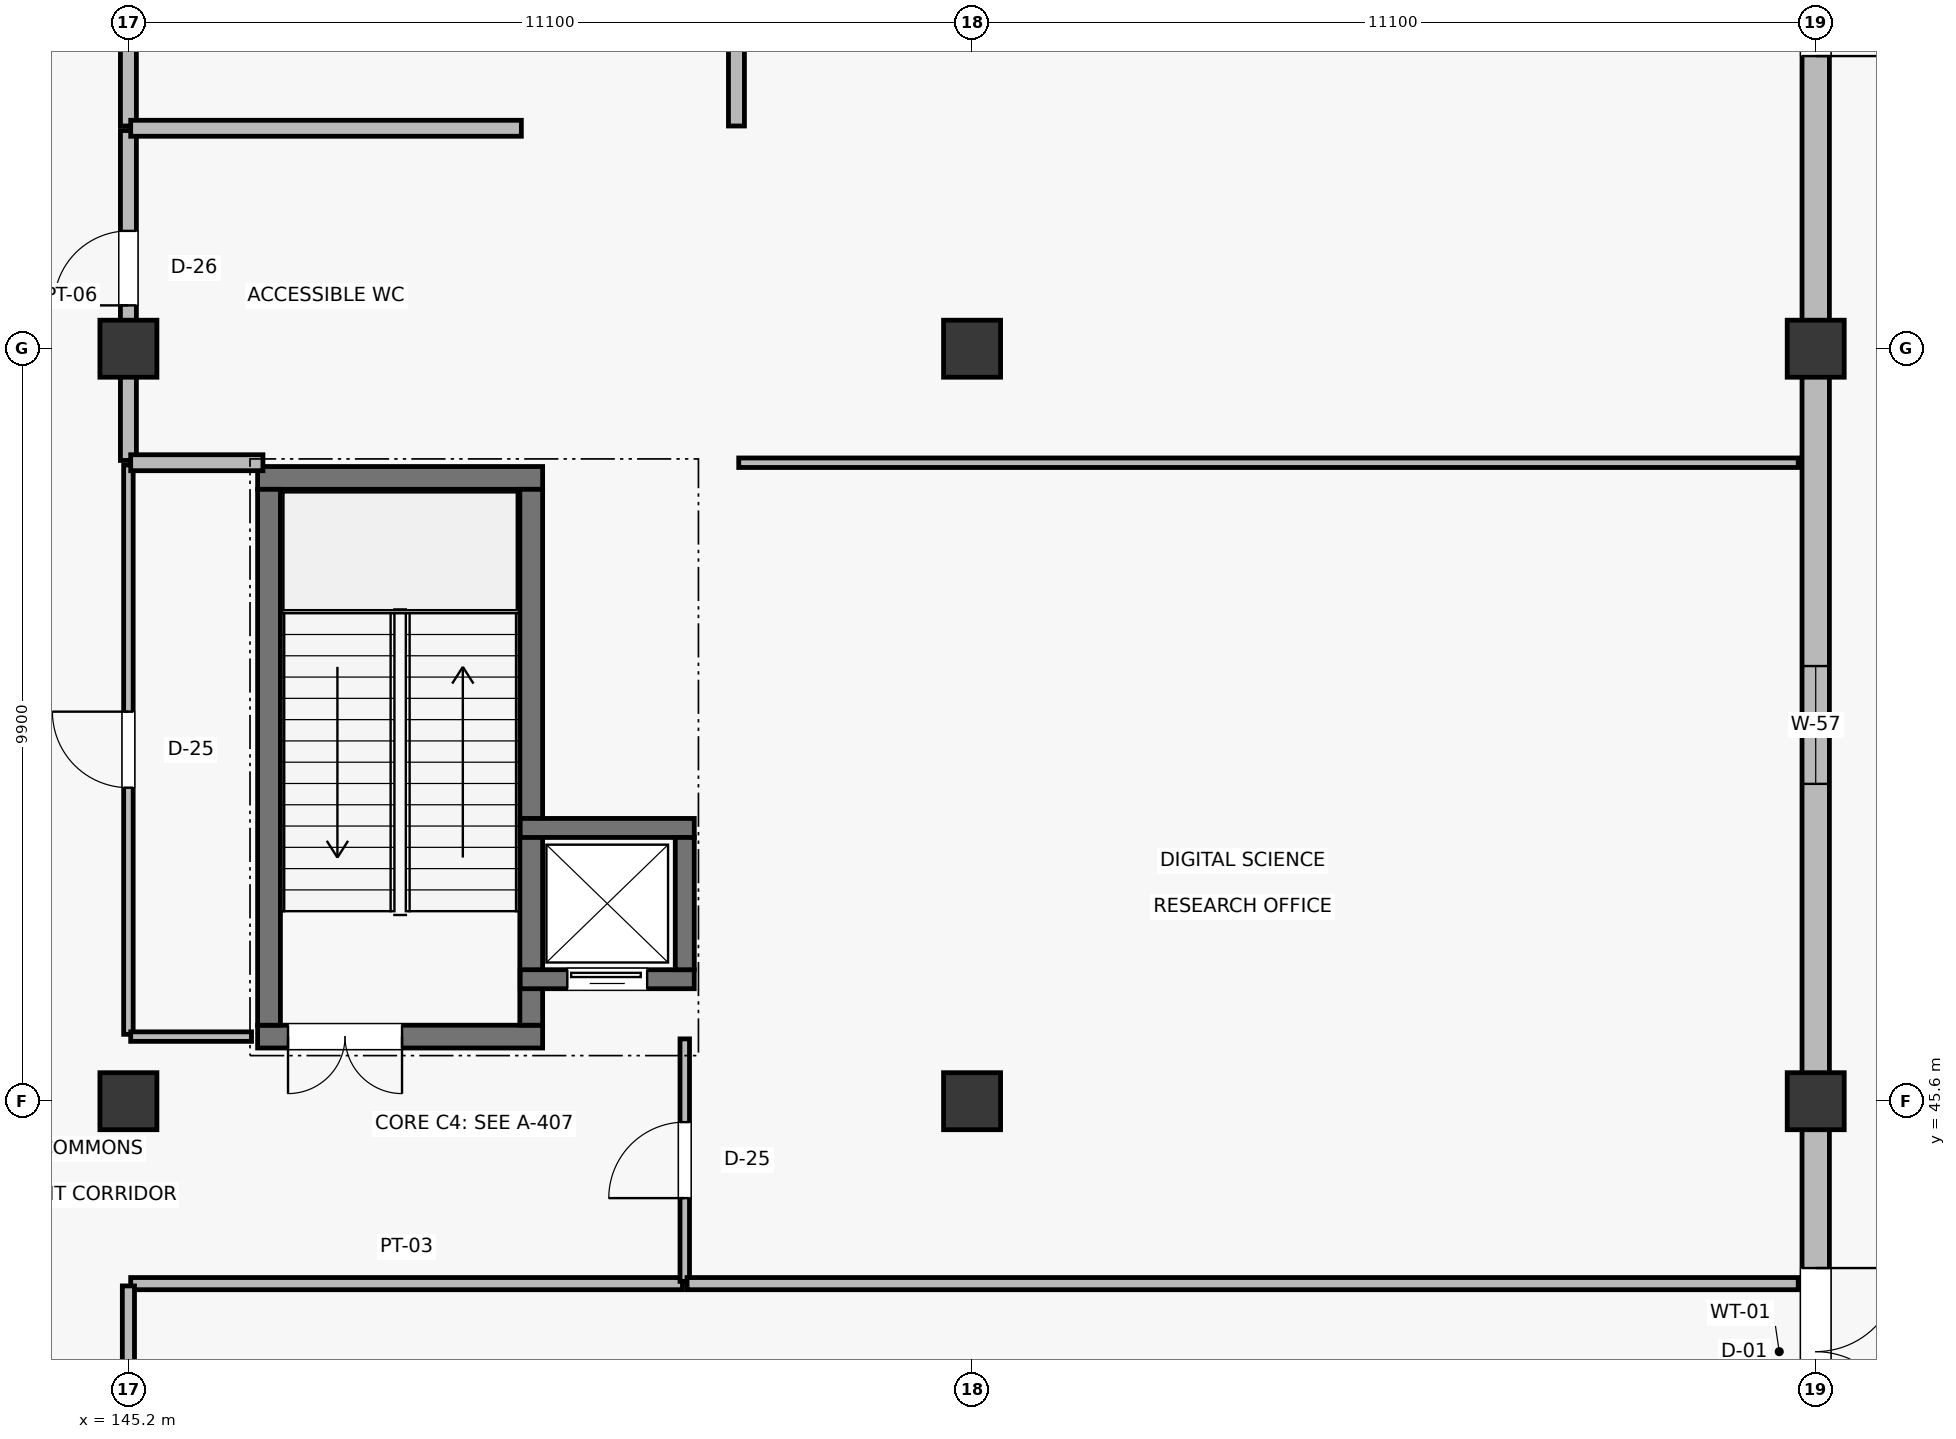
"""IFC4 building model, lengths in metres.
Left out: names, types, materials, properties, quantities, classifications, styles, units other than length and angle.
Written with IfcOpenShell. Run it as: python <this file> out.ifc"""

import sys

from ifc_helpers import new_model, si_unit, direction, frame, frame_2d, origin, origin_2d, place, context, subcontext, project, spatial, rectangle, extrude, element, fill, save


model = new_model("IFC4")
c1 = context("Model", 3, precision=1e-05, world=origin(), true_north=direction((0.0, 1.0)))
c2 = subcontext(c1, "Body", "Model", "MODEL_VIEW")
j1 = project(units=[si_unit("LENGTHUNIT", "METRE"), si_unit("PLANEANGLEUNIT", "RADIAN")], contexts=[c1])
p1 = place(None, origin())
s1 = spatial("IfcSite", under=j1, at=p1, CompositionType="ELEMENT")
p2 = place(p1, origin())
s2 = spatial("IfcBuilding", under=s1, at=p2, CompositionType="ELEMENT")
p3 = place(p2, origin())
s3 = spatial("IfcBuildingStorey", under=s2, at=p3, CompositionType="ELEMENT", Elevation=0.0)
for number, where, z_axis, x_axis in (
    (1, (145.2, 45.6, 0.0), (0.0, 0.0, 1.0), (1.0, 0.0, 0.0)),
    (2, (145.2, 55.5, 0.0), (0.0, 0.0, 1.0), (1.0, 0.0, 0.0)),
    (3, (156.3, 45.6, 0.0), (0.0, 0.0, 1.0), (1.0, 0.0, 0.0)),
    (4, (156.3, 55.5, 0.0), (0.0, 0.0, 1.0), (1.0, 0.0, 0.0)),
    (5, (167.4, 45.6, 0.0), (0.0, 0.0, 1.0), (1.0, 0.0, 0.0)),
    (6, (167.4, 55.5, 0.0), (0.0, 0.0, 1.0), (1.0, 0.0, 0.0)),
):
    element("IfcColumn", number, at=place(p3, frame(where, z_axis=z_axis, x_axis=x_axis)), inside=s3, PredefinedType="COLUMN", context=c2, shape_type="SweptSolid", body=[
        extrude(rectangle(XDim=0.75, YDim=0.75, at=origin_2d()), origin(), (0.0, 0.0, 1.0), 5.4),
    ])
p4 = place(p3, frame((167.4, 39.365, 0.0), z_axis=(0.0, 0.0, 1.0), x_axis=(0.0, 1.0, 0.0)))
e7 = element("IfcWall", 7, at=p4, inside=s3, PredefinedType="SOLIDWALL", context=c2, shape_type="SweptSolid", body=[
    extrude(rectangle(XDim=5.88, YDim=0.36, at=frame_2d((2.94, 0.0))), origin(), (0.0, 0.0, 1.0), 4.415),
])
p5 = place(p4, frame((1.84, 0.0, 0.0)))
e8 = element("IfcOpeningElement", 8, at=p5, cuts=e7, PredefinedType="OPENING", context=c2, shape_type="SweptSolid", body=[
    extrude(rectangle(XDim=2.2, YDim=2.5, at=frame_2d((1.1, 1.25))), frame((0.0, 0.19, 0.0), z_axis=(0.0, -1.0, 0.0), x_axis=(1.0, 0.0, 0.0)), (0.0, 0.0, 1.0), 0.38),
])
p6 = place(p3, frame((167.4, 45.965, 0.0), z_axis=(0.0, 0.0, 1.0), x_axis=(0.0, 1.0, 0.0)))
e9 = element("IfcWall", 9, at=p6, inside=s3, PredefinedType="SOLIDWALL", context=c2, shape_type="SweptSolid", body=[
    extrude(rectangle(XDim=9.17, YDim=0.36, at=frame_2d((4.585, 0.0))), origin(), (0.0, 0.0, 1.0), 4.415),
])
p7 = place(p6, frame((3.81, 0.0, 0.85)))
e10 = element("IfcOpeningElement", 10, at=p7, cuts=e9, PredefinedType="OPENING", context=c2, shape_type="SweptSolid", body=[
    extrude(rectangle(XDim=1.55, YDim=1.15, at=frame_2d((0.775, 0.575))), frame((0.0, 0.19, 0.0), z_axis=(0.0, -1.0, 0.0), x_axis=(1.0, 0.0, 0.0)), (0.0, 0.0, 1.0), 0.38),
])
p8 = place(p3, frame((167.4, 55.865, 0.0), z_axis=(0.0, 0.0, 1.0), x_axis=(0.0, 1.0, 0.0)))
e11 = element("IfcWall", 11, at=p8, inside=s3, PredefinedType="SOLIDWALL", context=c2, shape_type="SweptSolid", body=[
    extrude(rectangle(XDim=9.17, YDim=0.36, at=frame_2d((4.585, 0.0))), origin(), (0.0, 0.0, 1.0), 4.415),
])
p9 = place(p8, frame((3.485, 0.0, 0.0)))
e12 = element("IfcOpeningElement", 12, at=p9, cuts=e11, PredefinedType="OPENING", context=c2, shape_type="SweptSolid", body=[
    extrude(rectangle(XDim=2.2, YDim=2.5, at=frame_2d((1.1, 1.25))), frame((0.0, 0.19, 0.0), z_axis=(0.0, -1.0, 0.0), x_axis=(1.0, 0.0, 0.0)), (0.0, 0.0, 1.0), 0.38),
])
p10 = place(p3, frame((146.9, 46.45, 0.0), z_axis=(0.0, 0.0, 1.0), x_axis=(1.0, 0.0, 0.0)))
e13 = element("IfcWall", 13, at=p10, inside=s3, PredefinedType="SHEAR", context=c2, shape_type="SweptSolid", body=[
    extrude(rectangle(XDim=3.75, YDim=0.3, at=frame_2d((1.875, 0.0))), origin(), (0.0, 0.0, 1.0), 5.18),
])
p11 = place(p10, frame((0.4, 0.0, 0.0)))
e14 = element("IfcOpeningElement", 14, at=p11, cuts=e13, PredefinedType="OPENING", context=c2, shape_type="SweptSolid", body=[
    extrude(rectangle(XDim=1.5, YDim=2.2, at=frame_2d((0.75, 1.1))), frame((0.0, 0.16, 0.0), z_axis=(0.0, -1.0, 0.0), x_axis=(1.0, 0.0, 0.0)), (0.0, 0.0, 1.0), 0.32),
])
p12 = place(p3, frame((146.9, 53.8, 0.0), z_axis=(0.0, 0.0, 1.0), x_axis=(1.0, 0.0, 0.0)))
e15 = element("IfcWall", 15, at=p12, inside=s3, PredefinedType="SHEAR", context=c2, shape_type="SweptSolid", body=[
    extrude(rectangle(XDim=3.75, YDim=0.3, at=frame_2d((1.875, 0.0))), origin(), (0.0, 0.0, 1.0), 5.18),
])
for number, where, z_axis, x_axis in (
    (16, (147.05, 46.6, 0.0), (0.0, 0.0, 1.0), (0.0, 1.0, 0.0)),
    (17, (150.5, 46.6, 0.0), (0.0, 0.0, 1.0), (0.0, 1.0, 0.0)),
):
    element("IfcWall", number, at=place(p3, frame(where, z_axis=z_axis, x_axis=x_axis)), inside=s3, PredefinedType="SHEAR", context=c2, shape_type="SweptSolid", body=[
        extrude(rectangle(XDim=7.05, YDim=0.3, at=frame_2d((3.525, 0.0))), origin(), (0.0, 0.0, 1.0), 5.18),
    ])
p13 = place(p3, frame((150.355, 47.205, 0.0), z_axis=(0.0, 0.0, 1.0), x_axis=(1.0, 0.0, 0.0)))
e18 = element("IfcWall", 18, at=p13, inside=s3, PredefinedType="SHEAR", context=c2, shape_type="SweptSolid", body=[
    extrude(rectangle(XDim=2.29, YDim=0.25, at=frame_2d((1.145, 0.0))), origin(), (0.0, 0.0, 1.0), 5.16),
])
p14 = place(p13, frame((0.62, 0.0, 0.0)))
e19 = element("IfcOpeningElement", 19, at=p14, cuts=e18, PredefinedType="OPENING", context=c2, shape_type="SweptSolid", body=[
    extrude(rectangle(XDim=1.05, YDim=2.15, at=frame_2d((0.525, 1.075))), frame((0.0, 0.135, 0.0), z_axis=(0.0, -1.0, 0.0), x_axis=(1.0, 0.0, 0.0)), (0.0, 0.0, 1.0), 0.27),
])
p15 = place(p3, frame((150.355, 49.195, 0.0), z_axis=(0.0, 0.0, 1.0), x_axis=(1.0, 0.0, 0.0)))
e20 = element("IfcWall", 20, at=p15, inside=s3, PredefinedType="SHEAR", context=c2, shape_type="SweptSolid", body=[
    extrude(rectangle(XDim=2.29, YDim=0.25, at=frame_2d((1.145, 0.0))), origin(), (0.0, 0.0, 1.0), 5.16),
])
p16 = place(p3, frame((152.52, 47.33, 0.0), z_axis=(0.0, 0.0, 1.0), x_axis=(0.0, 1.0, 0.0)))
e21 = element("IfcWall", 21, at=p16, inside=s3, PredefinedType="SHEAR", context=c2, shape_type="SweptSolid", body=[
    extrude(rectangle(XDim=1.74, YDim=0.25, at=frame_2d((0.87, 0.0))), origin(), (0.0, 0.0, 1.0), 5.16),
])
p17 = place(p3, frame((145.23, 43.2, 0.0), z_axis=(0.0, 0.0, 1.0), x_axis=(1.0, 0.0, 0.0)))
e22 = element("IfcWall", 22, at=p17, inside=s3, PredefinedType="PARTITIONING", context=c2, shape_type="SweptSolid", body=[
    extrude(rectangle(XDim=7.26, YDim=0.16, at=frame_2d((3.63, 0.0))), origin(), (0.0, 0.0, 1.0), 4.465),
])
p18 = place(p3, frame((145.2, 36.13, 0.0), z_axis=(0.0, 0.0, 1.0), x_axis=(0.0, 1.0, 0.0)))
e23 = element("IfcWall", 23, at=p18, inside=s3, PredefinedType="PARTITIONING", context=c2, shape_type="SweptSolid", body=[
    extrude(rectangle(XDim=7.04, YDim=0.16, at=frame_2d((3.52, 0.0))), origin(), (0.0, 0.0, 1.0), 4.465),
])
p19 = place(p3, frame((152.52, 43.23, 0.0), z_axis=(0.0, 0.0, 1.0), x_axis=(0.0, 1.0, 0.0)))
e24 = element("IfcWall", 24, at=p19, inside=s3, PredefinedType="PARTITIONING", context=c2, shape_type="SweptSolid", body=[
    extrude(rectangle(XDim=3.19, YDim=0.125, at=frame_2d((1.595, 0.0))), origin(), (0.0, 0.0, 1.0), 4.355),
])
p20 = place(p19, frame((1.095, 0.0, 0.0)))
e25 = element("IfcOpeningElement", 25, at=p20, cuts=e24, PredefinedType="OPENING", context=c2, shape_type="SweptSolid", body=[
    extrude(rectangle(XDim=1.0, YDim=2.15, at=frame_2d((0.5, 1.075))), frame((0.0, 0.073, 0.0), z_axis=(0.0, -1.0, 0.0), x_axis=(1.0, 0.0, 0.0)), (0.0, 0.0, 1.0), 0.145),
])
p21 = place(p3, frame((145.2, 54.03, 0.0), z_axis=(0.0, 0.0, 1.0), x_axis=(0.0, 1.0, 0.0)))
e26 = element("IfcWall", 26, at=p21, inside=s3, PredefinedType="PLUMBINGWALL", context=c2, shape_type="SweptSolid", body=[
    extrude(rectangle(XDim=4.34, YDim=0.21, at=frame_2d((2.17, 0.0))), origin(), (0.0, 0.0, 1.0), 4.265),
])
p22 = place(p21, frame((2.04, 0.0, 0.0)))
e27 = element("IfcOpeningElement", 27, at=p22, cuts=e26, PredefinedType="OPENING", context=c2, shape_type="SweptSolid", body=[
    extrude(rectangle(XDim=0.98, YDim=2.1, at=frame_2d((0.49, 1.05))), frame((0.0, 0.115, 0.0), z_axis=(0.0, -1.0, 0.0), x_axis=(1.0, 0.0, 0.0)), (0.0, 0.0, 1.0), 0.23),
])
p23 = place(p3, frame((145.2, 58.43, 0.0), z_axis=(0.0, 0.0, 1.0), x_axis=(0.0, 1.0, 0.0)))
e28 = element("IfcWall", 28, at=p23, inside=s3, PredefinedType="PLUMBINGWALL", context=c2, shape_type="SweptSolid", body=[
    extrude(rectangle(XDim=6.34, YDim=0.21, at=frame_2d((3.17, 0.0))), origin(), (0.0, 0.0, 1.0), 4.265),
])
p24 = place(p23, frame((2.71, 0.0, 0.0)))
e29 = element("IfcOpeningElement", 29, at=p24, cuts=e28, PredefinedType="OPENING", context=c2, shape_type="SweptSolid", body=[
    extrude(rectangle(XDim=0.92, YDim=2.1, at=frame_2d((0.46, 1.05))), frame((0.0, 0.115, 0.0), z_axis=(0.0, -1.0, 0.0), x_axis=(1.0, 0.0, 0.0)), (0.0, 0.0, 1.0), 0.23),
])
p25 = place(p3, frame((145.2, 46.48, 0.0), z_axis=(0.0, 0.0, 1.0), x_axis=(0.0, 1.0, 0.0)))
e30 = element("IfcWall", 30, at=p25, inside=s3, PredefinedType="PARTITIONING", context=c2, shape_type="SweptSolid", body=[
    extrude(rectangle(XDim=7.49, YDim=0.125, at=frame_2d((3.745, 0.0))), origin(), (0.0, 0.0, 1.0), 4.265),
])
p26 = place(p25, frame((3.245, 0.0, 0.0)))
e31 = element("IfcOpeningElement", 31, at=p26, cuts=e30, PredefinedType="OPENING", context=c2, shape_type="SweptSolid", body=[
    extrude(rectangle(XDim=1.0, YDim=2.15, at=frame_2d((0.5, 1.075))), frame((0.0, 0.073, 0.0), z_axis=(0.0, -1.0, 0.0), x_axis=(1.0, 0.0, 0.0)), (0.0, 0.0, 1.0), 0.145),
])
p27 = place(p3, frame((145.23, 46.45, 0.0), z_axis=(0.0, 0.0, 1.0), x_axis=(1.0, 0.0, 0.0)))
e32 = element("IfcWall", 32, at=p27, inside=s3, PredefinedType="PARTITIONING", context=c2, shape_type="SweptSolid", body=[
    extrude(rectangle(XDim=1.59, YDim=0.125, at=frame_2d((0.795, 0.0))), origin(), (0.0, 0.0, 1.0), 4.265),
])
p28 = place(p3, frame((152.55, 43.2, 0.0), z_axis=(0.0, 0.0, 1.0), x_axis=(1.0, 0.0, 0.0)))
e33 = element("IfcWall", 33, at=p28, inside=s3, PredefinedType="PARTITIONING", context=c2, shape_type="SweptSolid", body=[
    extrude(rectangle(XDim=14.62, YDim=0.16, at=frame_2d((7.31, 0.0))), origin(), (0.0, 0.0, 1.0), 4.415),
])
p29 = place(p3, frame((153.23, 54.0, 0.0), z_axis=(0.0, 0.0, 1.0), x_axis=(1.0, 0.0, 0.0)))
e34 = element("IfcWall", 34, at=p29, inside=s3, PredefinedType="PARTITIONING", context=c2, shape_type="SweptSolid", body=[
    extrude(rectangle(XDim=13.94, YDim=0.125, at=frame_2d((6.97, 0.0))), origin(), (0.0, 0.0, 1.0), 4.265),
])
p30 = place(p3, frame((145.23, 58.4, 0.0), z_axis=(0.0, 0.0, 1.0), x_axis=(1.0, 0.0, 0.0)))
e35 = element("IfcWall", 35, at=p30, inside=s3, PredefinedType="PLUMBINGWALL", context=c2, shape_type="SweptSolid", body=[
    extrude(rectangle(XDim=5.14, YDim=0.21, at=frame_2d((2.57, 0.0))), origin(), (0.0, 0.0, 1.0), 4.265),
])
p31 = place(p3, frame((145.23, 54.0, 0.0), z_axis=(0.0, 0.0, 1.0), x_axis=(1.0, 0.0, 0.0)))
e36 = element("IfcWall", 36, at=p31, inside=s3, PredefinedType="PLUMBINGWALL", context=c2, shape_type="SweptSolid", body=[
    extrude(rectangle(XDim=1.74, YDim=0.21, at=frame_2d((0.87, 0.0))), origin(), (0.0, 0.0, 1.0), 4.265),
])
p32 = place(p3, frame((153.2, 58.43, 0.0), z_axis=(0.0, 0.0, 1.0), x_axis=(0.0, 1.0, 0.0)))
e37 = element("IfcWall", 37, at=p32, inside=s3, PredefinedType="PLUMBINGWALL", context=c2, shape_type="SweptSolid", body=[
    extrude(rectangle(XDim=6.34, YDim=0.21, at=frame_2d((3.17, 0.0))), origin(), (0.0, 0.0, 1.0), 5.08),
])
p33 = place(p5, frame((2.2, 0.0, 0.0), z_axis=(0.0, 0.0, 1.0), x_axis=(-1.0, 0.0, 0.0)))
e38 = element("IfcDoor", 38, at=p33, inside=s3, OperationType="DOUBLE_DOOR_SINGLE_SWING", PredefinedType="DOOR", context=c2, shape_type="SweptSolid", body=[
    extrude(rectangle(XDim=2.2, YDim=2.5, at=frame_2d((1.1, 1.25))), frame((0.0, 0.025, 0.0), z_axis=(0.0, -1.0, 0.0), x_axis=(1.0, 0.0, 0.0)), (0.0, 0.0, 1.0), 0.05),
])
fill(e8, e38)
p34 = place(p7, frame((1.55, 0.0, 0.0), z_axis=(0.0, 0.0, 1.0), x_axis=(-1.0, 0.0, 0.0)))
e39 = element("IfcWindow", 39, at=p34, inside=s3, PartitioningType="DOUBLE_PANEL_VERTICAL", PredefinedType="WINDOW", context=c2, shape_type="SweptSolid", body=[
    extrude(rectangle(XDim=1.55, YDim=1.15, at=frame_2d((0.775, 0.575))), frame((0.0, 0.03, 0.0), z_axis=(0.0, -1.0, 0.0), x_axis=(1.0, 0.0, 0.0)), (0.0, 0.0, 1.0), 0.06),
])
fill(e10, e39)
p35 = place(p9, frame((2.2, 0.0, 0.0), z_axis=(0.0, 0.0, 1.0), x_axis=(-1.0, 0.0, 0.0)))
e40 = element("IfcDoor", 40, at=p35, inside=s3, OperationType="DOUBLE_DOOR_SINGLE_SWING", PredefinedType="DOOR", context=c2, shape_type="SweptSolid", body=[
    extrude(rectangle(XDim=2.2, YDim=2.5, at=frame_2d((1.1, 1.25))), frame((0.0, 0.025, 0.0), z_axis=(0.0, -1.0, 0.0), x_axis=(1.0, 0.0, 0.0)), (0.0, 0.0, 1.0), 0.05),
])
fill(e12, e40)
p36 = place(p11, frame((1.5, 0.0, 0.0), z_axis=(0.0, 0.0, 1.0), x_axis=(-1.0, 0.0, 0.0)))
e41 = element("IfcDoor", 41, at=p36, inside=s3, OperationType="DOUBLE_DOOR_SINGLE_SWING", PredefinedType="DOOR", context=c2, shape_type="SweptSolid", body=[
    extrude(rectangle(XDim=1.5, YDim=2.2, at=frame_2d((0.75, 1.1))), frame((0.0, 0.025, 0.0), z_axis=(0.0, -1.0, 0.0), x_axis=(1.0, 0.0, 0.0)), (0.0, 0.0, 1.0), 0.05),
])
fill(e14, e41)
p37 = place(p14, frame((1.05, 0.0, 0.0), z_axis=(0.0, 0.0, 1.0), x_axis=(-1.0, 0.0, 0.0)))
e42 = element("IfcDoor", 42, at=p37, inside=s3, OperationType="SLIDING_TO_RIGHT", PredefinedType="DOOR", context=c2, shape_type="SweptSolid", body=[
    extrude(rectangle(XDim=1.05, YDim=2.15, at=frame_2d((0.525, 1.075))), frame((0.0, 0.025, 0.0), z_axis=(0.0, -1.0, 0.0), x_axis=(1.0, 0.0, 0.0)), (0.0, 0.0, 1.0), 0.05),
])
fill(e19, e42)
p38 = place(p20, origin())
e43 = element("IfcDoor", 43, at=p38, inside=s3, OperationType="SINGLE_SWING_LEFT", PredefinedType="DOOR", context=c2, shape_type="SweptSolid", body=[
    extrude(rectangle(XDim=1.0, YDim=2.15, at=frame_2d((0.5, 1.075))), frame((0.0, 0.025, 0.0), z_axis=(0.0, -1.0, 0.0), x_axis=(1.0, 0.0, 0.0)), (0.0, 0.0, 1.0), 0.05),
])
fill(e25, e43)
p39 = place(p22, origin())
e44 = element("IfcDoor", 44, at=p39, inside=s3, OperationType="SINGLE_SWING_LEFT", PredefinedType="DOOR", context=c2, shape_type="SweptSolid", body=[
    extrude(rectangle(XDim=0.98, YDim=2.1, at=frame_2d((0.49, 1.05))), frame((0.0, 0.025, 0.0), z_axis=(0.0, -1.0, 0.0), x_axis=(1.0, 0.0, 0.0)), (0.0, 0.0, 1.0), 0.05),
])
fill(e27, e44)
p40 = place(p26, origin())
e45 = element("IfcDoor", 45, at=p40, inside=s3, OperationType="SINGLE_SWING_RIGHT", PredefinedType="DOOR", context=c2, shape_type="SweptSolid", body=[
    extrude(rectangle(XDim=1.0, YDim=2.15, at=frame_2d((0.5, 1.075))), frame((0.0, 0.025, 0.0), z_axis=(0.0, -1.0, 0.0), x_axis=(1.0, 0.0, 0.0)), (0.0, 0.0, 1.0), 0.05),
])
fill(e31, e45)
save(model, sys.argv[1])
